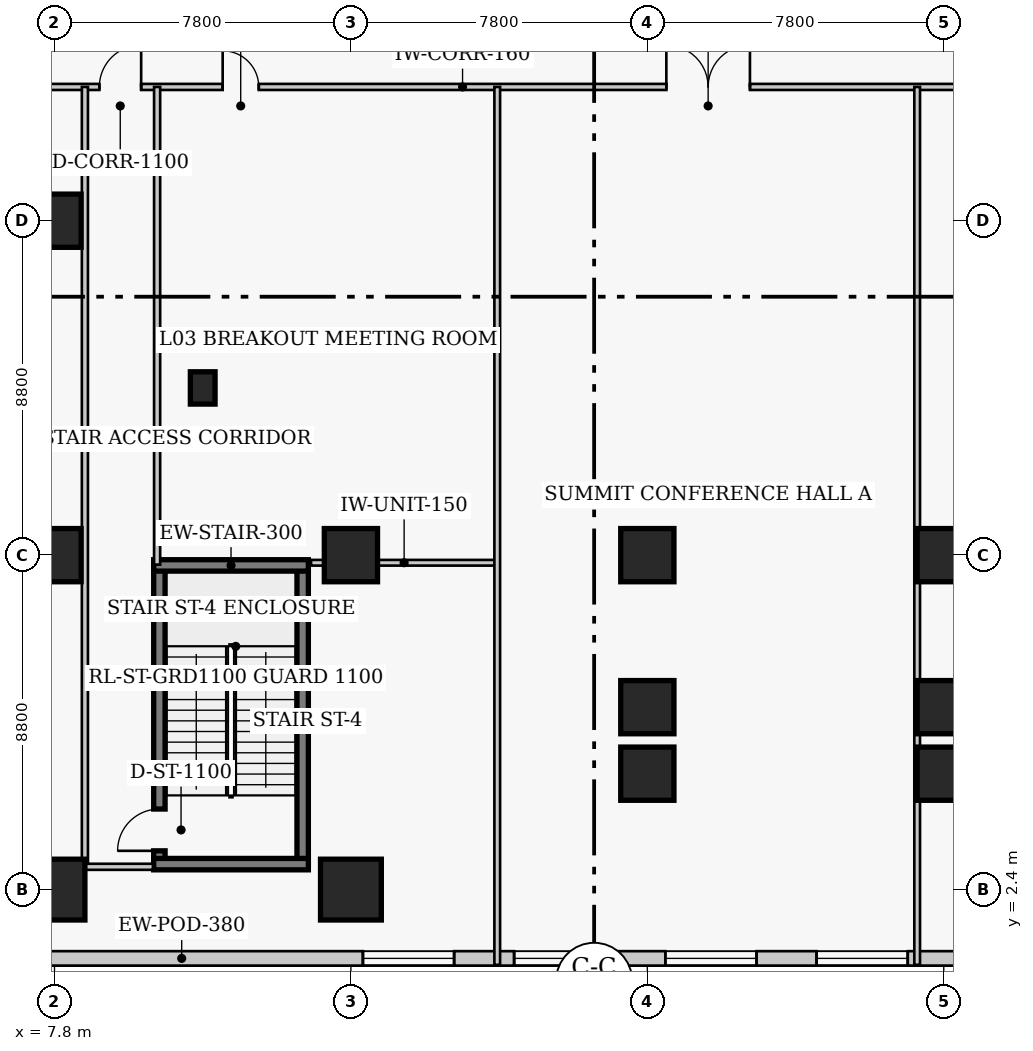
"""IFC4 building model, lengths in metres.
Left out: names, types, materials, properties, quantities, classifications, styles, units other than length and angle.
Written with IfcOpenShell. Run it as: python <this file> out.ifc"""

import sys

from ifc_helpers import new_model, si_unit, direction, frame, frame_2d, origin, origin_2d, place, context, subcontext, project, spatial, rectangle, extrude, element, fill, save


model = new_model("IFC4")
c1 = context("Model", 3, precision=1e-05, world=origin(), true_north=direction((0.0, 1.0)))
c2 = subcontext(c1, "Body", "Model", "MODEL_VIEW")
j1 = project(units=[si_unit("LENGTHUNIT", "METRE"), si_unit("PLANEANGLEUNIT", "RADIAN")], contexts=[c1])
p1 = place(None, origin())
s1 = spatial("IfcSite", under=j1, at=p1, CompositionType="ELEMENT")
p2 = place(p1, origin())
s2 = spatial("IfcBuilding", under=s1, at=p2, CompositionType="ELEMENT")
p3 = place(p2, frame((0.0, 0.0, 15.8)))
s3 = spatial("IfcBuildingStorey", under=s2, at=p3, CompositionType="ELEMENT", Elevation=15.8)
p4 = place(p3, frame((10.56, 3.07, 0.0), z_axis=(0.0, 0.0, 1.0), x_axis=(0.0, 1.0, 0.0)))
e1 = element("IfcWall", 1, at=p4, inside=s3, PredefinedType="SHEAR", context=c2, shape_type="SweptSolid", body=[
    extrude(rectangle(XDim=7.86, YDim=0.3, at=frame_2d((3.93, 0.0))), origin(), (0.0, 0.0, 1.0), 5.0),
])
p5 = place(p4, frame((0.35, 0.0, 0.0)))
e2 = element("IfcOpeningElement", 2, at=p5, cuts=e1, PredefinedType="OPENING", context=c2, shape_type="SweptSolid", body=[
    extrude(rectangle(XDim=1.1, YDim=2.15, at=frame_2d((0.55, 1.075))), frame((0.0, 0.16, 0.0), z_axis=(0.0, -1.0, 0.0), x_axis=(1.0, 0.0, 0.0)), (0.0, 0.0, 1.0), 0.32),
])
p6 = place(p3, frame((14.33, 3.07, 0.0), z_axis=(0.0, 0.0, 1.0), x_axis=(0.0, 1.0, 0.0)))
e3 = element("IfcWall", 3, at=p6, inside=s3, PredefinedType="SHEAR", context=c2, shape_type="SweptSolid", body=[
    extrude(rectangle(XDim=7.86, YDim=0.3, at=frame_2d((3.93, 0.0))), origin(), (0.0, 0.0, 1.0), 5.0),
])
for number, where, z_axis, x_axis in (
    (4, (10.41, 10.93, 0.0), (0.0, 0.0, 1.0), (1.0, 0.0, 0.0)),
    (5, (10.41, 3.07, 0.0), (0.0, 0.0, 1.0), (1.0, 0.0, 0.0)),
):
    element("IfcWall", number, at=place(p3, frame(where, z_axis=z_axis, x_axis=x_axis)), inside=s3, PredefinedType="SHEAR", context=c2, shape_type="SweptSolid", body=[
        extrude(rectangle(XDim=4.07, YDim=0.3, at=frame_2d((2.035, 0.0))), origin(), (0.0, 0.0, 1.0), 5.0),
    ])
p7 = place(p3, frame((7.8, 2.4, 0.0), z_axis=(0.0, 0.0, 1.0), x_axis=(1.0, 0.0, 0.0)))
e6 = element("IfcColumn", 6, at=p7, inside=s3, PredefinedType="COLUMN", context=c2, shape_type="SweptSolid", body=[
    extrude(rectangle(XDim=1.6, YDim=1.6, at=origin_2d()), origin(), (0.0, 0.0, 1.0), 5.0),
])
for number, where, z_axis, x_axis in (
    (7, (7.8, 11.2, 0.0), (0.0, 0.0, 1.0), (1.0, 0.0, 0.0)),
    (8, (7.8, 20.0, 0.0), (0.0, 0.0, 1.0), (1.0, 0.0, 0.0)),
):
    element("IfcColumn", number, at=place(p3, frame(where, z_axis=z_axis, x_axis=x_axis)), inside=s3, PredefinedType="COLUMN", context=c2, shape_type="SweptSolid", body=[
        extrude(rectangle(XDim=1.4, YDim=1.4, at=origin_2d()), origin(), (0.0, 0.0, 1.0), 5.0),
    ])
p8 = place(p3, frame((15.6, 2.4, 0.0), z_axis=(0.0, 0.0, 1.0), x_axis=(1.0, 0.0, 0.0)))
e9 = element("IfcColumn", 9, at=p8, inside=s3, PredefinedType="COLUMN", context=c2, shape_type="SweptSolid", body=[
    extrude(rectangle(XDim=1.6, YDim=1.6, at=origin_2d()), origin(), (0.0, 0.0, 1.0), 5.0),
])
for number, where, z_axis, x_axis in (
    (10, (15.6, 11.2, 0.0), (0.0, 0.0, 1.0), (1.0, 0.0, 0.0)),
    (11, (23.4, 11.2, 0.0), (0.0, 0.0, 1.0), (1.0, 0.0, 0.0)),
    (12, (31.2, 11.2, 0.0), (0.0, 0.0, 1.0), (1.0, 0.0, 0.0)),
    (13, (23.4, 7.2, 0.0), (0.0, 0.0, 1.0), (1.0, 0.0, 0.0)),
    (14, (31.2, 7.2, 0.0), (0.0, 0.0, 1.0), (1.0, 0.0, 0.0)),
    (15, (23.4, 5.45, 0.0), (0.0, 0.0, 1.0), (1.0, 0.0, 0.0)),
    (16, (31.2, 5.45, 0.0), (0.0, 0.0, 1.0), (1.0, 0.0, 0.0)),
):
    element("IfcColumn", number, at=place(p3, frame(where, z_axis=z_axis, x_axis=x_axis)), inside=s3, PredefinedType="COLUMN", context=c2, shape_type="SweptSolid", body=[
        extrude(rectangle(XDim=1.4, YDim=1.4, at=origin_2d()), origin(), (0.0, 0.0, 1.0), 5.0),
    ])
p9 = place(p3, frame((11.7, 15.6, 0.0), z_axis=(0.0, 0.0, 1.0), x_axis=(1.0, 0.0, 0.0)))
e17 = element("IfcColumn", 17, at=p9, inside=s3, PredefinedType="PILASTER", context=c2, shape_type="SweptSolid", body=[
    extrude(rectangle(XDim=0.65, YDim=0.85, at=origin_2d()), origin(), (0.0, 0.0, 1.0), 5.0),
])
p10 = place(p3, frame((-0.79, 0.59, 0.0), z_axis=(0.0, 0.0, 1.0), x_axis=(1.0, 0.0, 0.0)))
e18 = element("IfcWall", 18, at=p10, inside=s3, PredefinedType="SOLIDWALL", context=c2, shape_type="SweptSolid", body=[
    extrude(rectangle(XDim=79.58, YDim=0.38, at=frame_2d((39.79, 0.0))), origin(), (0.0, 0.0, 1.0), 4.58),
])
p11 = place(p10, frame((1.439, 0.0, 0.75)))
e19 = element("IfcOpeningElement", 19, at=p11, cuts=e18, PredefinedType="OPENING", context=c2, shape_type="SweptSolid", body=[
    extrude(rectangle(XDim=2.4, YDim=2.2, at=frame_2d((1.2, 1.1))), frame((0.0, 0.2, 0.0), z_axis=(0.0, -1.0, 0.0), x_axis=(1.0, 0.0, 0.0)), (0.0, 0.0, 1.0), 0.4),
])
p12 = place(p10, frame((4.769, 0.0, 0.75)))
e20 = element("IfcOpeningElement", 20, at=p12, cuts=e18, PredefinedType="OPENING", context=c2, shape_type="SweptSolid", body=[
    extrude(rectangle(XDim=2.4, YDim=2.2, at=frame_2d((1.2, 1.1))), frame((0.0, 0.2, 0.0), z_axis=(0.0, -1.0, 0.0), x_axis=(1.0, 0.0, 0.0)), (0.0, 0.0, 1.0), 0.4),
])
p13 = place(p10, frame((16.706, 0.0, 0.75)))
e21 = element("IfcOpeningElement", 21, at=p13, cuts=e18, PredefinedType="OPENING", context=c2, shape_type="SweptSolid", body=[
    extrude(rectangle(XDim=2.4, YDim=2.2, at=frame_2d((1.2, 1.1))), frame((0.0, 0.2, 0.0), z_axis=(0.0, -1.0, 0.0), x_axis=(1.0, 0.0, 0.0)), (0.0, 0.0, 1.0), 0.4),
])
p14 = place(p10, frame((20.685, 0.0, 0.75)))
e22 = element("IfcOpeningElement", 22, at=p14, cuts=e18, PredefinedType="OPENING", context=c2, shape_type="SweptSolid", body=[
    extrude(rectangle(XDim=2.4, YDim=2.2, at=frame_2d((1.2, 1.1))), frame((0.0, 0.2, 0.0), z_axis=(0.0, -1.0, 0.0), x_axis=(1.0, 0.0, 0.0)), (0.0, 0.0, 1.0), 0.4),
])
p15 = place(p10, frame((24.664, 0.0, 0.75)))
e23 = element("IfcOpeningElement", 23, at=p15, cuts=e18, PredefinedType="OPENING", context=c2, shape_type="SweptSolid", body=[
    extrude(rectangle(XDim=2.4, YDim=2.2, at=frame_2d((1.2, 1.1))), frame((0.0, 0.2, 0.0), z_axis=(0.0, -1.0, 0.0), x_axis=(1.0, 0.0, 0.0)), (0.0, 0.0, 1.0), 0.4),
])
p16 = place(p10, frame((28.643, 0.0, 0.75)))
e24 = element("IfcOpeningElement", 24, at=p16, cuts=e18, PredefinedType="OPENING", context=c2, shape_type="SweptSolid", body=[
    extrude(rectangle(XDim=2.4, YDim=2.2, at=frame_2d((1.2, 1.1))), frame((0.0, 0.2, 0.0), z_axis=(0.0, -1.0, 0.0), x_axis=(1.0, 0.0, 0.0)), (0.0, 0.0, 1.0), 0.4),
])
p17 = place(p10, frame((32.622, 0.0, 0.75)))
e25 = element("IfcOpeningElement", 25, at=p17, cuts=e18, PredefinedType="OPENING", context=c2, shape_type="SweptSolid", body=[
    extrude(rectangle(XDim=2.4, YDim=2.2, at=frame_2d((1.2, 1.1))), frame((0.0, 0.2, 0.0), z_axis=(0.0, -1.0, 0.0), x_axis=(1.0, 0.0, 0.0)), (0.0, 0.0, 1.0), 0.4),
])
p18 = place(p10, frame((37.75, 0.0, 0.75)))
e26 = element("IfcOpeningElement", 26, at=p18, cuts=e18, PredefinedType="OPENING", context=c2, shape_type="SweptSolid", body=[
    extrude(rectangle(XDim=2.4, YDim=2.2, at=frame_2d((1.2, 1.1))), frame((0.0, 0.2, 0.0), z_axis=(0.0, -1.0, 0.0), x_axis=(1.0, 0.0, 0.0)), (0.0, 0.0, 1.0), 0.4),
])
p19 = place(p10, frame((44.559, 0.0, 0.75)))
e27 = element("IfcOpeningElement", 27, at=p19, cuts=e18, PredefinedType="OPENING", context=c2, shape_type="SweptSolid", body=[
    extrude(rectangle(XDim=2.4, YDim=2.2, at=frame_2d((1.2, 1.1))), frame((0.0, 0.2, 0.0), z_axis=(0.0, -1.0, 0.0), x_axis=(1.0, 0.0, 0.0)), (0.0, 0.0, 1.0), 0.4),
])
p20 = place(p10, frame((48.538, 0.0, 0.75)))
e28 = element("IfcOpeningElement", 28, at=p20, cuts=e18, PredefinedType="OPENING", context=c2, shape_type="SweptSolid", body=[
    extrude(rectangle(XDim=2.4, YDim=2.2, at=frame_2d((1.2, 1.1))), frame((0.0, 0.2, 0.0), z_axis=(0.0, -1.0, 0.0), x_axis=(1.0, 0.0, 0.0)), (0.0, 0.0, 1.0), 0.4),
])
p21 = place(p10, frame((56.496, 0.0, 0.75)))
e29 = element("IfcOpeningElement", 29, at=p21, cuts=e18, PredefinedType="OPENING", context=c2, shape_type="SweptSolid", body=[
    extrude(rectangle(XDim=2.4, YDim=2.2, at=frame_2d((1.2, 1.1))), frame((0.0, 0.2, 0.0), z_axis=(0.0, -1.0, 0.0), x_axis=(1.0, 0.0, 0.0)), (0.0, 0.0, 1.0), 0.4),
])
p22 = place(p10, frame((60.475, 0.0, 0.75)))
e30 = element("IfcOpeningElement", 30, at=p22, cuts=e18, PredefinedType="OPENING", context=c2, shape_type="SweptSolid", body=[
    extrude(rectangle(XDim=2.4, YDim=2.2, at=frame_2d((1.2, 1.1))), frame((0.0, 0.2, 0.0), z_axis=(0.0, -1.0, 0.0), x_axis=(1.0, 0.0, 0.0)), (0.0, 0.0, 1.0), 0.4),
])
p23 = place(p10, frame((64.454, 0.0, 0.75)))
e31 = element("IfcOpeningElement", 31, at=p23, cuts=e18, PredefinedType="OPENING", context=c2, shape_type="SweptSolid", body=[
    extrude(rectangle(XDim=2.4, YDim=2.2, at=frame_2d((1.2, 1.1))), frame((0.0, 0.2, 0.0), z_axis=(0.0, -1.0, 0.0), x_axis=(1.0, 0.0, 0.0)), (0.0, 0.0, 1.0), 0.4),
])
p24 = place(p10, frame((68.433, 0.0, 0.75)))
e32 = element("IfcOpeningElement", 32, at=p24, cuts=e18, PredefinedType="OPENING", context=c2, shape_type="SweptSolid", body=[
    extrude(rectangle(XDim=2.4, YDim=2.2, at=frame_2d((1.2, 1.1))), frame((0.0, 0.2, 0.0), z_axis=(0.0, -1.0, 0.0), x_axis=(1.0, 0.0, 0.0)), (0.0, 0.0, 1.0), 0.4),
])
p25 = place(p10, frame((72.412, 0.0, 0.75)))
e33 = element("IfcOpeningElement", 33, at=p25, cuts=e18, PredefinedType="OPENING", context=c2, shape_type="SweptSolid", body=[
    extrude(rectangle(XDim=2.4, YDim=2.2, at=frame_2d((1.2, 1.1))), frame((0.0, 0.2, 0.0), z_axis=(0.0, -1.0, 0.0), x_axis=(1.0, 0.0, 0.0)), (0.0, 0.0, 1.0), 0.4),
])
p26 = place(p10, frame((75.74, 0.0, 0.75)))
e34 = element("IfcOpeningElement", 34, at=p26, cuts=e18, PredefinedType="OPENING", context=c2, shape_type="SweptSolid", body=[
    extrude(rectangle(XDim=2.4, YDim=2.2, at=frame_2d((1.2, 1.1))), frame((0.0, 0.2, 0.0), z_axis=(0.0, -1.0, 0.0), x_axis=(1.0, 0.0, 0.0)), (0.0, 0.0, 1.0), 0.4),
])
p27 = place(p3, frame((-2.98, 23.52, 0.0), z_axis=(0.0, 0.0, 1.0), x_axis=(1.0, 0.0, 0.0)))
e35 = element("IfcWall", 35, at=p27, inside=s3, PredefinedType="PARTITIONING", context=c2, shape_type="SweptSolid", body=[
    extrude(rectangle(XDim=83.96, YDim=0.16, at=frame_2d((41.98, 0.0))), origin(), (0.0, 0.0, 1.0), 4.58),
])
p28 = place(p27, frame((7.13, 0.0, 0.0)))
e36 = element("IfcOpeningElement", 36, at=p28, cuts=e35, PredefinedType="OPENING", context=c2, shape_type="SweptSolid", body=[
    extrude(rectangle(XDim=1.0, YDim=2.15, at=frame_2d((0.5, 1.075))), frame((0.0, 0.09, 0.0), z_axis=(0.0, -1.0, 0.0), x_axis=(1.0, 0.0, 0.0)), (0.0, 0.0, 1.0), 0.18),
])
p29 = place(p27, frame((11.96, 0.0, 0.0)))
e37 = element("IfcOpeningElement", 37, at=p29, cuts=e35, PredefinedType="OPENING", context=c2, shape_type="SweptSolid", body=[
    extrude(rectangle(XDim=1.1, YDim=2.15, at=frame_2d((0.55, 1.075))), frame((0.0, 0.09, 0.0), z_axis=(0.0, -1.0, 0.0), x_axis=(1.0, 0.0, 0.0)), (0.0, 0.0, 1.0), 0.18),
])
p30 = place(p27, frame((15.205, 0.0, 0.0)))
e38 = element("IfcOpeningElement", 38, at=p30, cuts=e35, PredefinedType="OPENING", context=c2, shape_type="SweptSolid", body=[
    extrude(rectangle(XDim=0.95, YDim=2.1, at=frame_2d((0.475, 1.05))), frame((0.0, 0.09, 0.0), z_axis=(0.0, -1.0, 0.0), x_axis=(1.0, 0.0, 0.0)), (0.0, 0.0, 1.0), 0.18),
])
p31 = place(p27, frame((26.88, 0.0, 0.0)))
e39 = element("IfcOpeningElement", 39, at=p31, cuts=e35, PredefinedType="OPENING", context=c2, shape_type="SweptSolid", body=[
    extrude(rectangle(XDim=2.2, YDim=2.4, at=frame_2d((1.1, 1.2))), frame((0.0, 0.09, 0.0), z_axis=(0.0, -1.0, 0.0), x_axis=(1.0, 0.0, 0.0)), (0.0, 0.0, 1.0), 0.18),
])
p32 = place(p27, frame((37.88, 0.0, 0.0)))
e40 = element("IfcOpeningElement", 40, at=p32, cuts=e35, PredefinedType="OPENING", context=c2, shape_type="SweptSolid", body=[
    extrude(rectangle(XDim=2.2, YDim=2.4, at=frame_2d((1.1, 1.2))), frame((0.0, 0.09, 0.0), z_axis=(0.0, -1.0, 0.0), x_axis=(1.0, 0.0, 0.0)), (0.0, 0.0, 1.0), 0.18),
])
p33 = place(p27, frame((48.63, 0.0, 0.0)))
e41 = element("IfcOpeningElement", 41, at=p33, cuts=e35, PredefinedType="OPENING", context=c2, shape_type="SweptSolid", body=[
    extrude(rectangle(XDim=2.2, YDim=2.4, at=frame_2d((1.1, 1.2))), frame((0.0, 0.09, 0.0), z_axis=(0.0, -1.0, 0.0), x_axis=(1.0, 0.0, 0.0)), (0.0, 0.0, 1.0), 0.18),
])
p34 = place(p27, frame((59.08, 0.0, 0.0)))
e42 = element("IfcOpeningElement", 42, at=p34, cuts=e35, PredefinedType="OPENING", context=c2, shape_type="SweptSolid", body=[
    extrude(rectangle(XDim=2.2, YDim=2.4, at=frame_2d((1.1, 1.2))), frame((0.0, 0.09, 0.0), z_axis=(0.0, -1.0, 0.0), x_axis=(1.0, 0.0, 0.0)), (0.0, 0.0, 1.0), 0.18),
])
p35 = place(p27, frame((67.34, 0.0, 0.0)))
e43 = element("IfcOpeningElement", 43, at=p35, cuts=e35, PredefinedType="OPENING", context=c2, shape_type="SweptSolid", body=[
    extrude(rectangle(XDim=0.88, YDim=2.05, at=frame_2d((0.44, 1.025))), frame((0.0, 0.09, 0.0), z_axis=(0.0, -1.0, 0.0), x_axis=(1.0, 0.0, 0.0)), (0.0, 0.0, 1.0), 0.18),
])
p36 = place(p27, frame((76.29, 0.0, 0.0)))
e44 = element("IfcOpeningElement", 44, at=p36, cuts=e35, PredefinedType="OPENING", context=c2, shape_type="SweptSolid", body=[
    extrude(rectangle(XDim=0.88, YDim=2.05, at=frame_2d((0.44, 1.025))), frame((0.0, 0.09, 0.0), z_axis=(0.0, -1.0, 0.0), x_axis=(1.0, 0.0, 0.0)), (0.0, 0.0, 1.0), 0.18),
])
p37 = place(p3, frame((8.6, 3.0, 0.0), z_axis=(0.0, 0.0, 1.0), x_axis=(0.0, 1.0, 0.0)))
e45 = element("IfcWall", 45, at=p37, inside=s3, PredefinedType="PARTITIONING", context=c2, shape_type="SweptSolid", body=[
    extrude(rectangle(XDim=20.52, YDim=0.16, at=frame_2d((10.26, 0.0))), origin(), (0.0, 0.0, 1.0), 4.58),
])
p38 = place(p3, frame((10.5, 10.95, 0.0), z_axis=(0.0, 0.0, 1.0), x_axis=(0.0, 1.0, 0.0)))
e46 = element("IfcWall", 46, at=p38, inside=s3, PredefinedType="PARTITIONING", context=c2, shape_type="SweptSolid", body=[
    extrude(rectangle(XDim=12.57, YDim=0.16, at=frame_2d((6.285, 0.0))), origin(), (0.0, 0.0, 1.0), 4.58),
])
p39 = place(p3, frame((8.6, 3.0, 0.0), z_axis=(0.0, 0.0, 1.0), x_axis=(1.0, 0.0, 0.0)))
e47 = element("IfcWall", 47, at=p39, inside=s3, PredefinedType="PARTITIONING", context=c2, shape_type="SweptSolid", body=[
    extrude(rectangle(XDim=1.79, YDim=0.16, at=frame_2d((0.895, 0.0))), origin(), (0.0, 0.0, 1.0), 4.58),
])
p40 = place(p3, frame((14.55, 11.0, 0.0), z_axis=(0.0, 0.0, 1.0), x_axis=(1.0, 0.0, 0.0)))
e48 = element("IfcWall", 48, at=p40, inside=s3, PredefinedType="PARTITIONING", context=c2, shape_type="SweptSolid", body=[
    extrude(rectangle(XDim=4.9, YDim=0.15, at=frame_2d((2.45, 0.0))), origin(), (0.0, 0.0, 1.0), 3.54),
])
for number, where, z_axis, x_axis in (
    (49, (19.45, 0.42, 0.0), (0.0, 0.0, 1.0), (0.0, 1.0, 0.0)),
    (50, (30.5, 0.42, 0.0), (0.0, 0.0, 1.0), (0.0, 1.0, 0.0)),
):
    element("IfcWall", number, at=place(p3, frame(where, z_axis=z_axis, x_axis=x_axis)), inside=s3, PredefinedType="PARTITIONING", context=c2, shape_type="SweptSolid", body=[
        extrude(rectangle(XDim=23.1, YDim=0.15, at=frame_2d((11.55, 0.0))), origin(), (0.0, 0.0, 1.0), 4.58),
    ])
p41 = place(p13, origin())
e51 = element("IfcWindow", 51, at=p41, inside=s3, PartitioningType="SINGLE_PANEL", PredefinedType="WINDOW", context=c2, shape_type="SweptSolid", body=[
    extrude(rectangle(XDim=2.4, YDim=2.2, at=frame_2d((1.2, 1.1))), frame((0.0, 0.03, 0.0), z_axis=(0.0, -1.0, 0.0), x_axis=(1.0, 0.0, 0.0)), (0.0, 0.0, 1.0), 0.06),
])
fill(e21, e51)
p42 = place(p14, origin())
e52 = element("IfcWindow", 52, at=p42, inside=s3, PartitioningType="SINGLE_PANEL", PredefinedType="WINDOW", context=c2, shape_type="SweptSolid", body=[
    extrude(rectangle(XDim=2.4, YDim=2.2, at=frame_2d((1.2, 1.1))), frame((0.0, 0.03, 0.0), z_axis=(0.0, -1.0, 0.0), x_axis=(1.0, 0.0, 0.0)), (0.0, 0.0, 1.0), 0.06),
])
fill(e22, e52)
p43 = place(p15, origin())
e53 = element("IfcWindow", 53, at=p43, inside=s3, PartitioningType="SINGLE_PANEL", PredefinedType="WINDOW", context=c2, shape_type="SweptSolid", body=[
    extrude(rectangle(XDim=2.4, YDim=2.2, at=frame_2d((1.2, 1.1))), frame((0.0, 0.03, 0.0), z_axis=(0.0, -1.0, 0.0), x_axis=(1.0, 0.0, 0.0)), (0.0, 0.0, 1.0), 0.06),
])
fill(e23, e53)
p44 = place(p16, origin())
e54 = element("IfcWindow", 54, at=p44, inside=s3, PartitioningType="SINGLE_PANEL", PredefinedType="WINDOW", context=c2, shape_type="SweptSolid", body=[
    extrude(rectangle(XDim=2.4, YDim=2.2, at=frame_2d((1.2, 1.1))), frame((0.0, 0.03, 0.0), z_axis=(0.0, -1.0, 0.0), x_axis=(1.0, 0.0, 0.0)), (0.0, 0.0, 1.0), 0.06),
])
fill(e24, e54)
p45 = place(p29, origin())
e55 = element("IfcDoor", 55, at=p45, inside=s3, OperationType="SINGLE_SWING_RIGHT", PredefinedType="DOOR", context=c2, shape_type="SweptSolid", body=[
    extrude(rectangle(XDim=1.1, YDim=2.15, at=frame_2d((0.55, 1.075))), frame((0.0, 0.025, 0.0), z_axis=(0.0, -1.0, 0.0), x_axis=(1.0, 0.0, 0.0)), (0.0, 0.0, 1.0), 0.05),
])
fill(e37, e55)
p46 = place(p30, origin())
e56 = element("IfcDoor", 56, at=p46, inside=s3, OperationType="SINGLE_SWING_LEFT", PredefinedType="DOOR", context=c2, shape_type="SweptSolid", body=[
    extrude(rectangle(XDim=0.95, YDim=2.1, at=frame_2d((0.475, 1.05))), frame((0.0, 0.025, 0.0), z_axis=(0.0, -1.0, 0.0), x_axis=(1.0, 0.0, 0.0)), (0.0, 0.0, 1.0), 0.05),
])
fill(e38, e56)
p47 = place(p31, origin())
e57 = element("IfcDoor", 57, at=p47, inside=s3, OperationType="DOUBLE_DOOR_SINGLE_SWING", PredefinedType="DOOR", context=c2, shape_type="SweptSolid", body=[
    extrude(rectangle(XDim=2.2, YDim=2.4, at=frame_2d((1.1, 1.2))), frame((0.0, 0.025, 0.0), z_axis=(0.0, -1.0, 0.0), x_axis=(1.0, 0.0, 0.0)), (0.0, 0.0, 1.0), 0.05),
])
fill(e39, e57)
p48 = place(p5, origin())
e58 = element("IfcDoor", 58, at=p48, inside=s3, OperationType="SINGLE_SWING_LEFT", PredefinedType="DOOR", context=c2, shape_type="SweptSolid", body=[
    extrude(rectangle(XDim=1.1, YDim=2.15, at=frame_2d((0.55, 1.075))), frame((0.0, 0.025, 0.0), z_axis=(0.0, -1.0, 0.0), x_axis=(1.0, 0.0, 0.0)), (0.0, 0.0, 1.0), 0.05),
])
fill(e2, e58)
save(model, sys.argv[1])
